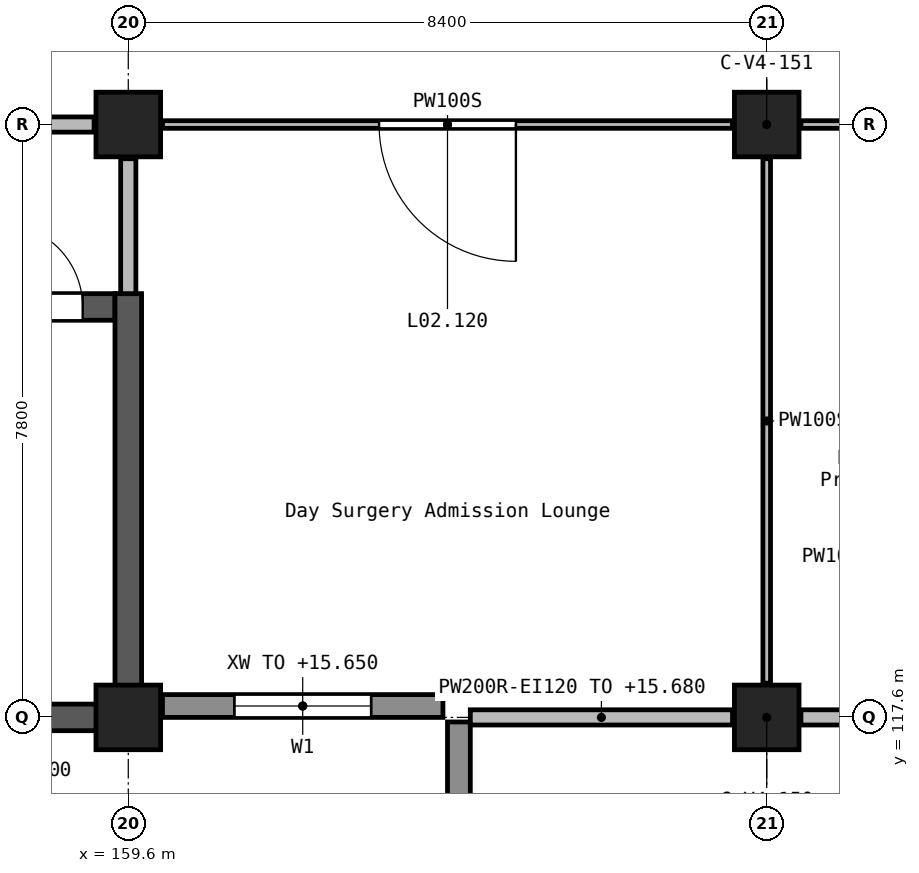
"""IFC4 building model, lengths in metres.
Left out: names, types, materials, properties, quantities, classifications, styles, units other than length and angle.
Written with IfcOpenShell. Run it as: python <this file> out.ifc"""

import sys

from ifc_helpers import new_model, si_unit, direction, frame, frame_2d, origin, origin_2d, place, context, subcontext, project, spatial, rectangle, extrude, element, fill, save


model = new_model("IFC4")
c1 = context("Model", 3, precision=1e-05, world=origin(), true_north=direction((0.0, 1.0)))
c2 = subcontext(c1, "Body", "Model", "MODEL_VIEW")
j1 = project(units=[si_unit("LENGTHUNIT", "METRE"), si_unit("PLANEANGLEUNIT", "RADIAN")], contexts=[c1])
p1 = place(None, origin())
s1 = spatial("IfcSite", under=j1, at=p1, CompositionType="ELEMENT")
p2 = place(p1, origin())
s2 = spatial("IfcBuilding", under=s1, at=p2, CompositionType="ELEMENT")
p3 = place(p2, frame((0.0, 0.0, 12.6)))
s3 = spatial("IfcBuildingStorey", under=s2, at=p3, CompositionType="ELEMENT", Elevation=12.6)
for number, where, z_axis, x_axis in (
    (1, (159.6, 117.6, 0.0), (0.0, 0.0, 1.0), (1.0, 0.0, 0.0)),
    (2, (159.6, 125.4, 0.0), (0.0, 0.0, 1.0), (1.0, 0.0, 0.0)),
    (3, (168.0, 117.6, 0.0), (0.0, 0.0, 1.0), (1.0, 0.0, 0.0)),
    (4, (168.0, 125.4, 0.0), (0.0, 0.0, 1.0), (1.0, 0.0, 0.0)),
):
    element("IfcColumn", number, at=place(p3, frame(where, z_axis=z_axis, x_axis=x_axis)), inside=s3, PredefinedType="COLUMN", context=c2, shape_type="SweptSolid", body=[
        extrude(rectangle(XDim=0.85, YDim=0.85, at=origin_2d()), origin(), (0.0, 0.0, 1.0), 4.2),
    ])
p4 = place(p3, frame((151.025, 123.0, 0.0), z_axis=(0.0, 0.0, 1.0), x_axis=(1.0, 0.0, 0.0)))
e5 = element("IfcWall", 5, at=p4, inside=s3, PredefinedType="SHEAR", context=c2, shape_type="SweptSolid", body=[
    extrude(rectangle(XDim=8.4, YDim=0.35, at=frame_2d((4.2, 0.0))), origin(), (0.0, 0.0, 1.0), 4.2),
])
p5 = place(p4, frame((6.875, 0.0, 0.0)))
e6 = element("IfcOpeningElement", 6, at=p5, cuts=e5, PredefinedType="OPENING", context=c2, shape_type="SweptSolid", body=[
    extrude(rectangle(XDim=1.1, YDim=2.1, at=frame_2d((0.55, 1.05))), frame((0.0, 0.185, 0.0), z_axis=(0.0, -1.0, 0.0), x_axis=(1.0, 0.0, 0.0)), (0.0, 0.0, 1.0), 0.37),
])
p6 = place(p3, frame((151.375, 117.6, 0.0), z_axis=(0.0, 0.0, 1.0), x_axis=(1.0, 0.0, 0.0)))
e7 = element("IfcWall", 7, at=p6, inside=s3, PredefinedType="SHEAR", context=c2, shape_type="SweptSolid", body=[
    extrude(rectangle(XDim=8.05, YDim=0.35, at=frame_2d((4.025, 0.0))), origin(), (0.0, 0.0, 1.0), 4.2),
])
p7 = place(p3, frame((159.6, 117.425, 0.0), z_axis=(0.0, 0.0, 1.0), x_axis=(0.0, 1.0, 0.0)))
e8 = element("IfcWall", 8, at=p7, inside=s3, PredefinedType="SHEAR", context=c2, shape_type="SweptSolid", body=[
    extrude(rectangle(XDim=5.75, YDim=0.35, at=frame_2d((2.875, 0.0))), origin(), (0.0, 0.0, 1.0), 4.2),
])
p8 = place(p3, frame((163.95, 117.54, 0.0), z_axis=(0.0, 0.0, 1.0), x_axis=(0.0, -1.0, 0.0)))
e9 = element("IfcWall", 9, at=p8, inside=s3, PredefinedType="STANDARD", context=c2, shape_type="SweptSolid", body=[
    extrude(rectangle(XDim=7.94, YDim=0.3, at=frame_2d((3.97, 0.0))), origin(), (0.0, 0.0, 1.0), 3.05),
])
p9 = place(p8, frame((1.385, 0.0, 1.2)))
e10 = element("IfcOpeningElement", 10, at=p9, cuts=e9, PredefinedType="OPENING", context=c2, shape_type="SweptSolid", body=[
    extrude(rectangle(XDim=1.2, YDim=1.2, at=frame_2d((0.6, 0.6))), frame((0.0, 0.16, 0.0), z_axis=(0.0, -1.0, 0.0), x_axis=(1.0, 0.0, 0.0)), (0.0, 0.0, 1.0), 0.32),
])
p10 = place(p8, frame((5.355, 0.0, 1.2)))
e11 = element("IfcOpeningElement", 11, at=p10, cuts=e9, PredefinedType="OPENING", context=c2, shape_type="SweptSolid", body=[
    extrude(rectangle(XDim=1.2, YDim=1.2, at=frame_2d((0.6, 0.6))), frame((0.0, 0.16, 0.0), z_axis=(0.0, -1.0, 0.0), x_axis=(1.0, 0.0, 0.0)), (0.0, 0.0, 1.0), 0.32),
])
p11 = place(p3, frame((160.05, 117.75, 0.0), z_axis=(0.0, 0.0, 1.0), x_axis=(1.0, 0.0, 0.0)))
e12 = element("IfcWall", 12, at=p11, inside=s3, PredefinedType="STANDARD", context=c2, shape_type="SweptSolid", body=[
    extrude(rectangle(XDim=3.69, YDim=0.3, at=frame_2d((1.845, 0.0))), origin(), (0.0, 0.0, 1.0), 3.05),
])
p12 = place(p11, frame((0.945, 0.0, 0.9)))
e13 = element("IfcOpeningElement", 13, at=p12, cuts=e12, PredefinedType="OPENING", context=c2, shape_type="SweptSolid", body=[
    extrude(rectangle(XDim=1.8, YDim=1.5, at=frame_2d((0.9, 0.75))), frame((0.0, 0.16, 0.0), z_axis=(0.0, -1.0, 0.0), x_axis=(1.0, 0.0, 0.0)), (0.0, 0.0, 1.0), 0.32),
])
p13 = place(p3, frame((175.95, 117.6, 0.0), z_axis=(0.0, 0.0, 1.0), x_axis=(-1.0, 0.0, 0.0)))
e14 = element("IfcWall", 14, at=p13, inside=s3, PredefinedType="SOLIDWALL", context=c2, shape_type="SweptSolid", body=[
    extrude(rectangle(XDim=7.5, YDim=0.2, at=frame_2d((3.75, 0.0))), origin(), (0.0, 0.0, 1.0), 3.03),
])
p14 = place(p3, frame((167.55, 117.6, 0.0), z_axis=(0.0, 0.0, 1.0), x_axis=(-1.0, 0.0, 0.0)))
e15 = element("IfcWall", 15, at=p14, inside=s3, PredefinedType="SOLIDWALL", context=c2, shape_type="SweptSolid", body=[
    extrude(rectangle(XDim=3.45, YDim=0.2, at=frame_2d((1.725, 0.0))), origin(), (0.0, 0.0, 1.0), 3.08),
])
p15 = place(p3, frame((151.65, 125.4, 0.0), z_axis=(0.0, 0.0, 1.0), x_axis=(1.0, 0.0, 0.0)))
e16 = element("IfcWall", 16, at=p15, inside=s3, PredefinedType="SOLIDWALL", context=c2, shape_type="SweptSolid", body=[
    extrude(rectangle(XDim=7.5, YDim=0.2, at=frame_2d((3.75, 0.0))), origin(), (0.0, 0.0, 1.0), 3.85),
])
p16 = place(p15, frame((3.2, 0.0, 0.0)))
e17 = element("IfcOpeningElement", 17, at=p16, cuts=e16, PredefinedType="OPENING", context=c2, shape_type="SweptSolid", body=[
    extrude(rectangle(XDim=1.1, YDim=2.1, at=frame_2d((0.55, 1.05))), frame((0.0, 0.11, 0.0), z_axis=(0.0, -1.0, 0.0), x_axis=(1.0, 0.0, 0.0)), (0.0, 0.0, 1.0), 0.22),
])
p17 = place(p3, frame((159.6, 123.175, 0.0), z_axis=(0.0, 0.0, 1.0), x_axis=(0.0, 1.0, 0.0)))
e18 = element("IfcWall", 18, at=p17, inside=s3, PredefinedType="SOLIDWALL", context=c2, shape_type="SweptSolid", body=[
    extrude(rectangle(XDim=1.775, YDim=0.2, at=frame_2d((0.887, 0.0))), origin(), (0.0, 0.0, 1.0), 3.85),
])
p18 = place(p3, frame((175.95, 125.4, 0.0), z_axis=(0.0, 0.0, 1.0), x_axis=(-1.0, 0.0, 0.0)))
e19 = element("IfcWall", 19, at=p18, inside=s3, PredefinedType="PARTITIONING", context=c2, shape_type="SweptSolid", body=[
    extrude(rectangle(XDim=7.5, YDim=0.1, at=frame_2d((3.75, 0.0))), origin(), (0.0, 0.0, 1.0), 3.85),
])
p19 = place(p18, frame((5.7, 0.0, 0.0)))
e20 = element("IfcOpeningElement", 20, at=p19, cuts=e19, PredefinedType="OPENING", context=c2, shape_type="SweptSolid", body=[
    extrude(rectangle(XDim=0.9, YDim=2.1, at=frame_2d((0.45, 1.05))), frame((0.0, 0.06, 0.0), z_axis=(0.0, -1.0, 0.0), x_axis=(1.0, 0.0, 0.0)), (0.0, 0.0, 1.0), 0.12),
])
p20 = place(p18, frame((2.4, 0.0, 0.0)))
e21 = element("IfcOpeningElement", 21, at=p20, cuts=e19, PredefinedType="OPENING", context=c2, shape_type="SweptSolid", body=[
    extrude(rectangle(XDim=0.9, YDim=2.1, at=frame_2d((0.45, 1.05))), frame((0.0, 0.06, 0.0), z_axis=(0.0, -1.0, 0.0), x_axis=(1.0, 0.0, 0.0)), (0.0, 0.0, 1.0), 0.12),
])
p21 = place(p3, frame((167.55, 125.4, 0.0), z_axis=(0.0, 0.0, 1.0), x_axis=(-1.0, 0.0, 0.0)))
e22 = element("IfcWall", 22, at=p21, inside=s3, PredefinedType="PARTITIONING", context=c2, shape_type="SweptSolid", body=[
    extrude(rectangle(XDim=7.5, YDim=0.1, at=frame_2d((3.75, 0.0))), origin(), (0.0, 0.0, 1.0), 3.85),
])
p22 = place(p21, frame((2.85, 0.0, 0.0)))
e23 = element("IfcOpeningElement", 23, at=p22, cuts=e22, PredefinedType="OPENING", context=c2, shape_type="SweptSolid", body=[
    extrude(rectangle(XDim=1.8, YDim=2.1, at=frame_2d((0.9, 1.05))), frame((0.0, 0.06, 0.0), z_axis=(0.0, -1.0, 0.0), x_axis=(1.0, 0.0, 0.0)), (0.0, 0.0, 1.0), 0.12),
])
p23 = place(p3, frame((168.0, 118.05, 0.0), z_axis=(0.0, 0.0, 1.0), x_axis=(0.0, 1.0, 0.0)))
e24 = element("IfcWall", 24, at=p23, inside=s3, PredefinedType="PARTITIONING", context=c2, shape_type="SweptSolid", body=[
    extrude(rectangle(XDim=6.9, YDim=0.1, at=frame_2d((3.45, 0.0))), origin(), (0.0, 0.0, 1.0), 3.03),
])
p24 = place(p12, origin())
e25 = element("IfcWindow", 25, at=p24, inside=s3, PartitioningType="SINGLE_PANEL", PredefinedType="WINDOW", context=c2, shape_type="SweptSolid", body=[
    extrude(rectangle(XDim=1.8, YDim=1.5, at=frame_2d((0.9, 0.75))), frame((0.0, 0.03, 0.0), z_axis=(0.0, -1.0, 0.0), x_axis=(1.0, 0.0, 0.0)), (0.0, 0.0, 1.0), 0.06),
])
fill(e13, e25)
p25 = place(p5, frame((1.1, 0.0, 0.0), z_axis=(0.0, 0.0, 1.0), x_axis=(-1.0, 0.0, 0.0)))
e26 = element("IfcDoor", 26, at=p25, inside=s3, OperationType="SINGLE_SWING_LEFT", PredefinedType="DOOR", context=c2, shape_type="SweptSolid", body=[
    extrude(rectangle(XDim=1.1, YDim=2.1, at=frame_2d((0.55, 1.05))), frame((0.0, 0.025, 0.0), z_axis=(0.0, -1.0, 0.0), x_axis=(1.0, 0.0, 0.0)), (0.0, 0.0, 1.0), 0.05),
])
fill(e6, e26)
p26 = place(p22, origin())
e27 = element("IfcDoor", 27, at=p26, inside=s3, OperationType="DOUBLE_DOOR_SINGLE_SWING", PredefinedType="DOOR", context=c2, shape_type="SweptSolid", body=[
    extrude(rectangle(XDim=1.8, YDim=2.1, at=frame_2d((0.9, 1.05))), frame((0.0, 0.025, 0.0), z_axis=(0.0, -1.0, 0.0), x_axis=(1.0, 0.0, 0.0)), (0.0, 0.0, 1.0), 0.05),
])
fill(e23, e27)
save(model, sys.argv[1])
